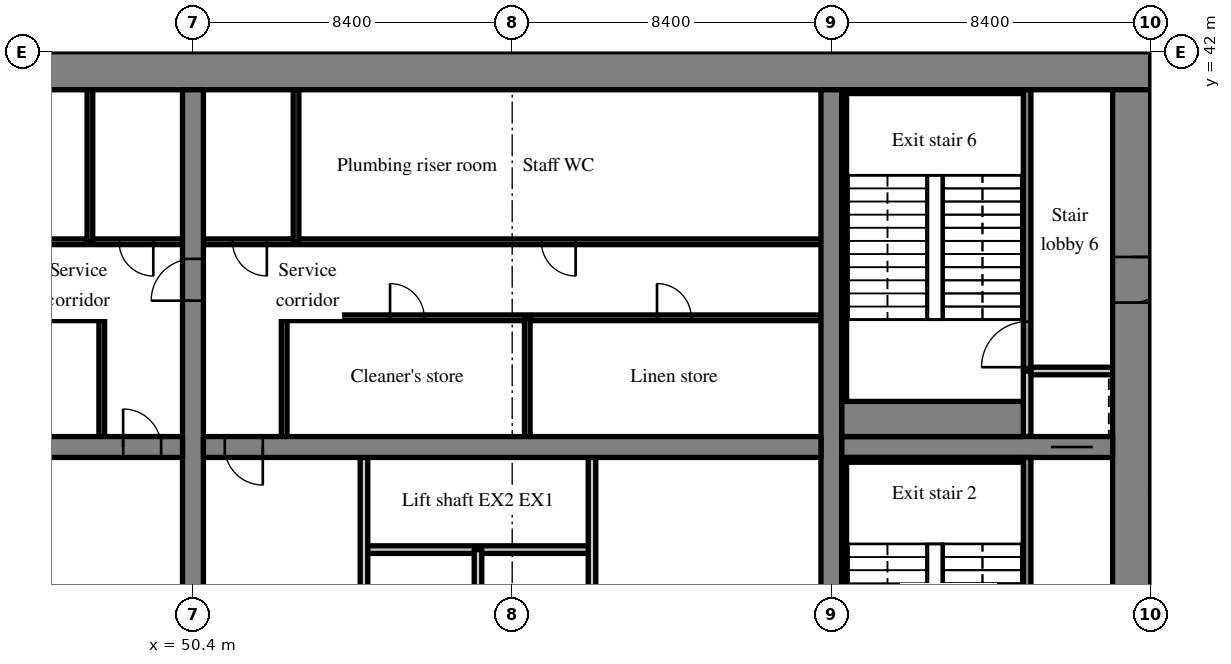
"""IFC4 building model, lengths in metres.
Left out: names, types, materials, properties, quantities, classifications, styles, units other than length and angle.
Written with IfcOpenShell. Run it as: python <this file> out.ifc"""

import sys

from ifc_helpers import new_model, si_unit, direction, frame, frame_2d, origin, place, context, subcontext, project, spatial, rectangle, extrude, source, transform, mapped, element, fill, save


model = new_model("IFC4")
c1 = context("Model", 3, precision=1e-05, world=origin(), true_north=direction((0.0, 1.0)))
c2 = subcontext(c1, "Body", "Model", "MODEL_VIEW")
j1 = project(units=[si_unit("LENGTHUNIT", "METRE"), si_unit("PLANEANGLEUNIT", "RADIAN")], contexts=[c1])
p1 = place(None, origin())
s1 = spatial("IfcSite", under=j1, at=p1, CompositionType="ELEMENT")
p2 = place(p1, origin())
s2 = spatial("IfcBuilding", under=s1, at=p2, CompositionType="ELEMENT")
p3 = place(p2, frame((0.0, 0.0, 50.6)))
s3 = spatial("IfcBuildingStorey", under=s2, at=p3, CompositionType="ELEMENT", Elevation=50.6)
m1 = source(origin(), c2, "Body", "SweptSolid", [
    extrude(rectangle(XDim=50.4, YDim=1.0, at=frame_2d((25.2, 0.0))), origin(), (0.0, 0.0, 1.0), 3.52),
])
p4 = place(p3, frame((25.2, 41.5, 0.0), z_axis=(0.0, 0.0, 1.0), x_axis=(1.0, 0.0, 0.0)))
e1 = element("IfcWall", 1, at=p4, inside=s3, PredefinedType="SHEAR", context=c2, shape_type="MappedRepresentation", body=[
    mapped(m1, transform((0.0, 0.0, 0.0), scale=1.0)),
])
m2 = source(origin(), c2, "Body", "SweptSolid", [
    extrude(rectangle(XDim=18.0, YDim=1.0, at=frame_2d((9.0, 0.0))), origin(), (0.0, 0.0, 1.0), 3.52),
])
p5 = place(p3, frame((75.1, 23.0, 0.0), z_axis=(0.0, 0.0, 1.0), x_axis=(0.0, 1.0, 0.0)))
e2 = element("IfcWall", 2, at=p5, inside=s3, PredefinedType="SHEAR", context=c2, shape_type="MappedRepresentation", body=[
    mapped(m2, transform((0.0, 0.0, 0.0), scale=1.0)),
])
m3 = source(origin(), c2, "Body", "SweptSolid", [
    extrude(rectangle(XDim=1.2, YDim=2.1, at=frame_2d((0.6, 1.05))), frame((0.0, 0.51, 0.0), z_axis=(0.0, -1.0, 0.0), x_axis=(1.0, 0.0, 0.0)), (0.0, 0.0, 1.0), 1.02),
])
p6 = place(p5, frame((12.4, 0.0, 0.0)))
e3 = element("IfcOpeningElement", 3, at=p6, cuts=e2, PredefinedType="OPENING", context=c2, shape_type="MappedRepresentation", body=[
    mapped(m3, transform((0.0, 0.0, 0.0), scale=1.0)),
])
m4 = source(origin(), c2, "Body", "SweptSolid", [
    extrude(rectangle(XDim=18.0, YDim=0.55, at=frame_2d((9.0, 0.0))), origin(), (0.0, 0.0, 1.0), 3.52),
])
p7 = place(p3, frame((50.4, 23.0, 0.0), z_axis=(0.0, 0.0, 1.0), x_axis=(0.0, 1.0, 0.0)))
e4 = element("IfcWall", 4, at=p7, inside=s3, PredefinedType="SHEAR", context=c2, shape_type="MappedRepresentation", body=[
    mapped(m4, transform((0.0, 0.0, 0.0), scale=1.0)),
])
m5 = source(origin(), c2, "Body", "SweptSolid", [
    extrude(rectangle(XDim=1.1, YDim=2.1, at=frame_2d((0.55, 1.05))), frame((0.0, 0.285, 0.0), z_axis=(0.0, -1.0, 0.0), x_axis=(1.0, 0.0, 0.0)), (0.0, 0.0, 1.0), 0.57),
])
p8 = place(p7, frame((12.45, 0.0, 0.0)))
e5 = element("IfcOpeningElement", 5, at=p8, cuts=e4, PredefinedType="OPENING", context=c2, shape_type="MappedRepresentation", body=[
    mapped(m5, transform((0.0, 0.0, 0.0), scale=1.0)),
])
p9 = place(p3, frame((67.2, 23.0, 0.0), z_axis=(0.0, 0.0, 1.0), x_axis=(0.0, 1.0, 0.0)))
e6 = element("IfcWall", 6, at=p9, inside=s3, PredefinedType="SHEAR", context=c2, shape_type="MappedRepresentation", body=[
    mapped(m4, transform((0.0, 0.0, 0.0), scale=1.0)),
])
m6 = source(origin(), c2, "Body", "SweptSolid", [
    extrude(rectangle(XDim=16.25, YDim=0.55, at=frame_2d((8.125, 0.0))), origin(), (0.0, 0.0, 1.0), 3.52),
])
p10 = place(p3, frame((33.875, 31.6, 0.0), z_axis=(0.0, 0.0, 1.0), x_axis=(1.0, 0.0, 0.0)))
e7 = element("IfcWall", 7, at=p10, inside=s3, PredefinedType="SHEAR", context=c2, shape_type="MappedRepresentation", body=[
    mapped(m6, transform((0.0, 0.0, 0.0), scale=1.0)),
])
m7 = source(origin(), c2, "Body", "SweptSolid", [
    extrude(rectangle(XDim=1.0, YDim=2.1, at=frame_2d((0.5, 1.05))), frame((0.0, 0.285, 0.0), z_axis=(0.0, -1.0, 0.0), x_axis=(1.0, 0.0, 0.0)), (0.0, 0.0, 1.0), 0.57),
])
p11 = place(p10, frame((14.687, 0.0, 0.0)))
e8 = element("IfcOpeningElement", 8, at=p11, cuts=e7, PredefinedType="OPENING", context=c2, shape_type="MappedRepresentation", body=[
    mapped(m7, transform((0.0, 0.0, 0.0), scale=1.0)),
])
p12 = place(p3, frame((50.675, 31.6, 0.0), z_axis=(0.0, 0.0, 1.0), x_axis=(1.0, 0.0, 0.0)))
e9 = element("IfcWall", 9, at=p12, inside=s3, PredefinedType="SHEAR", context=c2, shape_type="MappedRepresentation", body=[
    mapped(m6, transform((0.0, 0.0, 0.0), scale=1.0)),
])
p13 = place(p12, frame((0.562, 0.0, 0.0)))
e10 = element("IfcOpeningElement", 10, at=p13, cuts=e9, PredefinedType="OPENING", context=c2, shape_type="MappedRepresentation", body=[
    mapped(m7, transform((0.0, 0.0, 0.0), scale=1.0)),
])
m8 = source(origin(), c2, "Body", "SweptSolid", [
    extrude(rectangle(XDim=7.125, YDim=0.55, at=frame_2d((3.562, 0.0))), origin(), (0.0, 0.0, 1.0), 3.52),
])
p14 = place(p3, frame((67.475, 31.6, 0.0), z_axis=(0.0, 0.0, 1.0), x_axis=(1.0, 0.0, 0.0)))
e11 = element("IfcWall", 11, at=p14, inside=s3, PredefinedType="SHEAR", context=c2, shape_type="MappedRepresentation", body=[
    mapped(m8, transform((0.0, 0.0, 0.0), scale=1.0)),
])
p15 = place(p14, frame((5.5, 0.0, 0.0)))
e12 = element("IfcOpeningElement", 12, at=p15, cuts=e11, PredefinedType="OPENING", context=c2, shape_type="MappedRepresentation", body=[
    mapped(m5, transform((0.0, 0.0, 0.0), scale=1.0)),
])
m9 = source(origin(), c2, "Body", "SweptSolid", [
    extrude(rectangle(XDim=3.559, YDim=0.3, at=frame_2d((1.78, 0.0))), origin(), (0.0, 0.0, 1.0), 3.52),
])
p16 = place(p3, frame((76.523, 43.292, 0.0), z_axis=(0.0, 0.0, 1.0), x_axis=(-0.35779745313, -0.933799219604, 0.0)))
e13 = element("IfcWall", 13, at=p16, inside=s3, PredefinedType="SOLIDWALL", context=c2, shape_type="MappedRepresentation", body=[
    mapped(m9, transform((0.0, 0.0, 0.0), scale=1.0)),
])
m10 = source(origin(), c2, "Body", "SweptSolid", [
    extrude(rectangle(XDim=1.5, YDim=2.0, at=frame_2d((0.75, 1.0))), frame((0.0, 0.16, 0.0), z_axis=(0.0, -1.0, 0.0), x_axis=(1.0, 0.0, 0.0)), (0.0, 0.0, 1.0), 0.32),
])
p17 = place(p16, frame((0.156, 0.0, 0.9)))
e14 = element("IfcOpeningElement", 14, at=p17, cuts=e13, PredefinedType="OPENING", context=c2, shape_type="MappedRepresentation", body=[
    mapped(m10, transform((0.0, 0.0, 0.0), scale=1.0)),
])
m11 = source(origin(), c2, "Body", "SweptSolid", [
    extrude(rectangle(XDim=3.125, YDim=0.15, at=frame_2d((1.562, 0.0))), origin(), (0.0, 0.0, 1.0), 3.52),
])
p18 = place(p3, frame((48.0, 31.875, 0.0), z_axis=(0.0, 0.0, 1.0), x_axis=(0.0, 1.0, 0.0)))
e15 = element("IfcWall", 15, at=p18, inside=s3, PredefinedType="PARTITIONING", context=c2, shape_type="MappedRepresentation", body=[
    mapped(m11, transform((0.0, 0.0, 0.0), scale=1.0)),
])
m12 = source(origin(), c2, "Body", "SweptSolid", [
    extrude(rectangle(XDim=14.125, YDim=0.15, at=frame_2d((7.062, 0.0))), origin(), (0.0, 0.0, 1.0), 3.52),
])
p19 = place(p3, frame((33.875, 35.0, 0.0), z_axis=(0.0, 0.0, 1.0), x_axis=(1.0, 0.0, 0.0)))
e16 = element("IfcWall", 16, at=p19, inside=s3, PredefinedType="PARTITIONING", context=c2, shape_type="MappedRepresentation", body=[
    mapped(m12, transform((0.0, 0.0, 0.0), scale=1.0)),
])
m13 = source(origin(), c2, "Body", "SweptSolid", [
    extrude(rectangle(XDim=0.9, YDim=2.1, at=frame_2d((0.45, 1.05))), frame((0.0, 0.085, 0.0), z_axis=(0.0, -1.0, 0.0), x_axis=(1.0, 0.0, 0.0)), (0.0, 0.0, 1.0), 0.17),
])
p20 = place(p19, frame((6.575, 0.0, 0.0)))
e17 = element("IfcOpeningElement", 17, at=p20, cuts=e16, PredefinedType="OPENING", context=c2, shape_type="MappedRepresentation", body=[
    mapped(m13, transform((0.0, 0.0, 0.0), scale=1.0)),
])
m14 = source(origin(), c2, "Body", "SweptSolid", [
    extrude(rectangle(XDim=16.25, YDim=0.15, at=frame_2d((8.125, 0.0))), origin(), (0.0, 0.0, 1.0), 3.52),
])
p21 = place(p3, frame((33.875, 37.0, 0.0), z_axis=(0.0, 0.0, 1.0), x_axis=(1.0, 0.0, 0.0)))
e18 = element("IfcWall", 18, at=p21, inside=s3, PredefinedType="PARTITIONING", context=c2, shape_type="MappedRepresentation", body=[
    mapped(m14, transform((0.0, 0.0, 0.0), scale=1.0)),
])
p22 = place(p21, frame((0.769, 0.0, 0.0)))
e19 = element("IfcOpeningElement", 19, at=p22, cuts=e18, PredefinedType="OPENING", context=c2, shape_type="MappedRepresentation", body=[
    mapped(m13, transform((0.0, 0.0, 0.0), scale=1.0)),
])
p23 = place(p21, frame((3.613, 0.0, 0.0)))
e20 = element("IfcOpeningElement", 20, at=p23, cuts=e18, PredefinedType="OPENING", context=c2, shape_type="MappedRepresentation", body=[
    mapped(m13, transform((0.0, 0.0, 0.0), scale=1.0)),
])
p24 = place(p21, frame((9.3, 0.0, 0.0)))
e21 = element("IfcOpeningElement", 21, at=p24, cuts=e18, PredefinedType="OPENING", context=c2, shape_type="MappedRepresentation", body=[
    mapped(m13, transform((0.0, 0.0, 0.0), scale=1.0)),
])
p25 = place(p21, frame((14.581, 0.0, 0.0)))
e22 = element("IfcOpeningElement", 22, at=p25, cuts=e18, PredefinedType="OPENING", context=c2, shape_type="MappedRepresentation", body=[
    mapped(m13, transform((0.0, 0.0, 0.0), scale=1.0)),
])
m15 = source(origin(), c2, "Body", "SweptSolid", [
    extrude(rectangle(XDim=4.0, YDim=0.15, at=frame_2d((2.0, 0.0))), origin(), (0.0, 0.0, 1.0), 3.52),
])
p26 = place(p3, frame((47.688, 37.0, 0.0), z_axis=(0.0, 0.0, 1.0), x_axis=(0.0, 1.0, 0.0)))
e23 = element("IfcWall", 23, at=p26, inside=s3, PredefinedType="PARTITIONING", context=c2, shape_type="MappedRepresentation", body=[
    mapped(m15, transform((0.0, 0.0, 0.0), scale=1.0)),
])
m16 = source(origin(), c2, "Body", "SweptSolid", [
    extrude(rectangle(XDim=6.0, YDim=0.2, at=frame_2d((3.0, 0.0))), origin(), (0.0, 0.0, 1.0), 3.52),
])
p27 = place(p3, frame((60.9, 28.9, 0.0), z_axis=(0.0, 0.0, 1.0), x_axis=(-1.0, 0.0, 0.0)))
e24 = element("IfcWall", 24, at=p27, inside=s3, PredefinedType="SOLIDWALL", context=c2, shape_type="MappedRepresentation", body=[
    mapped(m16, transform((0.0, 0.0, 0.0), scale=1.0)),
])
m17 = source(origin(), c2, "Body", "SweptSolid", [
    extrude(rectangle(XDim=8.325, YDim=0.2, at=frame_2d((4.163, 0.0))), origin(), (0.0, 0.0, 1.0), 3.52),
])
for number, where, z_axis, x_axis in (
    (25, (54.9, 23.0, 0.0), (0.0, 0.0, 1.0), (0.0, 1.0, 0.0)),
    (26, (60.9, 23.0, 0.0), (0.0, 0.0, 1.0), (0.0, 1.0, 0.0)),
):
    element("IfcWall", number, at=place(p3, frame(where, z_axis=z_axis, x_axis=x_axis)), inside=s3, PredefinedType="PARTITIONING", context=c2, shape_type="MappedRepresentation", body=[
        mapped(m17, transform((0.0, 0.0, 0.0), scale=1.0)),
    ])
m18 = source(origin(), c2, "Body", "SweptSolid", [
    extrude(rectangle(XDim=5.9, YDim=0.2, at=frame_2d((2.95, 0.0))), origin(), (0.0, 0.0, 1.0), 3.52),
])
p28 = place(p3, frame((57.9, 23.0, 0.0), z_axis=(0.0, 0.0, 1.0), x_axis=(0.0, 1.0, 0.0)))
e27 = element("IfcWall", 27, at=p28, inside=s3, PredefinedType="PARTITIONING", context=c2, shape_type="MappedRepresentation", body=[
    mapped(m18, transform((0.0, 0.0, 0.0), scale=1.0)),
])
p29 = place(p3, frame((52.8, 31.875, 0.0), z_axis=(0.0, 0.0, 1.0), x_axis=(0.0, 1.0, 0.0)))
e28 = element("IfcWall", 28, at=p29, inside=s3, PredefinedType="PARTITIONING", context=c2, shape_type="MappedRepresentation", body=[
    mapped(m11, transform((0.0, 0.0, 0.0), scale=1.0)),
])
p30 = place(p3, frame((66.925, 35.0, 0.0), z_axis=(0.0, 0.0, 1.0), x_axis=(-1.0, 0.0, 0.0)))
e29 = element("IfcWall", 29, at=p30, inside=s3, PredefinedType="PARTITIONING", context=c2, shape_type="MappedRepresentation", body=[
    mapped(m12, transform((0.0, 0.0, 0.0), scale=1.0)),
])
p31 = place(p30, frame((3.414, 0.0, 0.0)))
e30 = element("IfcOpeningElement", 30, at=p31, cuts=e29, PredefinedType="OPENING", context=c2, shape_type="MappedRepresentation", body=[
    mapped(m13, transform((0.0, 0.0, 0.0), scale=1.0)),
])
p32 = place(p30, frame((10.439, 0.0, 0.0)))
e31 = element("IfcOpeningElement", 31, at=p32, cuts=e29, PredefinedType="OPENING", context=c2, shape_type="MappedRepresentation", body=[
    mapped(m13, transform((0.0, 0.0, 0.0), scale=1.0)),
])
p33 = place(p3, frame((66.925, 37.0, 0.0), z_axis=(0.0, 0.0, 1.0), x_axis=(-1.0, 0.0, 0.0)))
e32 = element("IfcWall", 32, at=p33, inside=s3, PredefinedType="PARTITIONING", context=c2, shape_type="MappedRepresentation", body=[
    mapped(m14, transform((0.0, 0.0, 0.0), scale=1.0)),
])
p34 = place(p33, frame((6.456, 0.0, 0.0)))
e33 = element("IfcOpeningElement", 33, at=p34, cuts=e32, PredefinedType="OPENING", context=c2, shape_type="MappedRepresentation", body=[
    mapped(m13, transform((0.0, 0.0, 0.0), scale=1.0)),
])
p35 = place(p33, frame((14.581, 0.0, 0.0)))
e34 = element("IfcOpeningElement", 34, at=p35, cuts=e32, PredefinedType="OPENING", context=c2, shape_type="MappedRepresentation", body=[
    mapped(m13, transform((0.0, 0.0, 0.0), scale=1.0)),
])
p36 = place(p3, frame((59.197, 31.875, 0.0), z_axis=(0.0, 0.0, 1.0), x_axis=(0.0, 1.0, 0.0)))
e35 = element("IfcWall", 35, at=p36, inside=s3, PredefinedType="PARTITIONING", context=c2, shape_type="MappedRepresentation", body=[
    mapped(m11, transform((0.0, 0.0, 0.0), scale=1.0)),
])
p37 = place(p3, frame((53.112, 37.0, 0.0), z_axis=(0.0, 0.0, 1.0), x_axis=(0.0, 1.0, 0.0)))
e36 = element("IfcWall", 36, at=p37, inside=s3, PredefinedType="PARTITIONING", context=c2, shape_type="MappedRepresentation", body=[
    mapped(m15, transform((0.0, 0.0, 0.0), scale=1.0)),
])
m19 = source(origin(), c2, "Body", "SweptSolid", [
    extrude(rectangle(XDim=8.325, YDim=0.2, at=frame_2d((4.163, 0.0))), origin(), (0.0, 0.0, 1.0), 3.52),
])
p38 = place(p3, frame((72.35, 23.0, 0.0), z_axis=(0.0, 0.0, 1.0), x_axis=(0.0, 1.0, 0.0)))
e37 = element("IfcWall", 37, at=p38, inside=s3, PredefinedType="SOLIDWALL", context=c2, shape_type="MappedRepresentation", body=[
    mapped(m19, transform((0.0, 0.0, 0.0), scale=1.0)),
])
m20 = source(origin(), c2, "Body", "SweptSolid", [
    extrude(rectangle(XDim=1.2, YDim=2.1, at=frame_2d((0.6, 1.05))), frame((0.0, 0.11, 0.0), z_axis=(0.0, -1.0, 0.0), x_axis=(1.0, 0.0, 0.0)), (0.0, 0.0, 1.0), 0.22),
])
p39 = place(p38, frame((0.6, 0.0, 0.0)))
e38 = element("IfcOpeningElement", 38, at=p39, cuts=e37, PredefinedType="OPENING", context=c2, shape_type="MappedRepresentation", body=[
    mapped(m20, transform((0.0, 0.0, 0.0), scale=1.0)),
])
m21 = source(origin(), c2, "Body", "SweptSolid", [
    extrude(rectangle(XDim=1.725, YDim=0.2, at=frame_2d((0.863, 0.0))), origin(), (0.0, 0.0, 1.0), 3.52),
])
p40 = place(p3, frame((72.35, 31.875, 0.0), z_axis=(0.0, 0.0, 1.0), x_axis=(0.0, 1.0, 0.0)))
e39 = element("IfcWall", 39, at=p40, inside=s3, PredefinedType="SOLIDWALL", context=c2, shape_type="MappedRepresentation", body=[
    mapped(m21, transform((0.0, 0.0, 0.0), scale=1.0)),
])
m22 = source(origin(), c2, "Body", "SweptSolid", [
    extrude(rectangle(XDim=2.15, YDim=0.2, at=frame_2d((1.075, 0.0))), origin(), (0.0, 0.0, 1.0), 3.52),
])
p41 = place(p3, frame((72.45, 33.6, 0.0), z_axis=(0.0, 0.0, 1.0), x_axis=(1.0, 0.0, 0.0)))
e40 = element("IfcWall", 40, at=p41, inside=s3, PredefinedType="SOLIDWALL", context=c2, shape_type="MappedRepresentation", body=[
    mapped(m22, transform((0.0, 0.0, 0.0), scale=1.0)),
])
m23 = source(origin(), c2, "Body", "SweptSolid", [
    extrude(rectangle(XDim=7.4, YDim=0.2, at=frame_2d((3.7, 0.0))), origin(), (0.0, 0.0, 1.0), 3.52),
])
p42 = place(p3, frame((72.35, 33.6, 0.0), z_axis=(0.0, 0.0, 1.0), x_axis=(0.0, 1.0, 0.0)))
e41 = element("IfcWall", 41, at=p42, inside=s3, PredefinedType="SOLIDWALL", context=c2, shape_type="MappedRepresentation", body=[
    mapped(m23, transform((0.0, 0.0, 0.0), scale=1.0)),
])
p43 = place(p42, frame((0.1, 0.0, 0.0)))
e42 = element("IfcOpeningElement", 42, at=p43, cuts=e41, PredefinedType="OPENING", context=c2, shape_type="MappedRepresentation", body=[
    mapped(m20, transform((0.0, 0.0, 0.0), scale=1.0)),
])
m24 = source(origin(), c2, "Body", "SweptSolid", [
    extrude(rectangle(XDim=8.2, YDim=0.2, at=frame_2d((4.1, 0.0))), origin(), (0.0, 0.0, 1.0), 3.52),
])
p44 = place(p3, frame((83.8, 30.4, 0.0), z_axis=(0.0, 0.0, 1.0), x_axis=(-1.0, 0.0, 0.0)))
e43 = element("IfcWall", 43, at=p44, inside=s3, PredefinedType="SOLIDWALL", context=c2, shape_type="MappedRepresentation", body=[
    mapped(m24, transform((0.0, 0.0, 0.0), scale=1.0)),
])
m25 = source(origin(), c2, "Body", "SweptSolid", [
    extrude(rectangle(XDim=1.0, YDim=2.1, at=frame_2d((0.5, 1.05))), frame((0.0, 0.11, 0.0), z_axis=(0.0, -1.0, 0.0), x_axis=(1.0, 0.0, 0.0)), (0.0, 0.0, 1.0), 0.22),
])
p45 = place(p44, frame((6.1, 0.0, 0.0)))
e44 = element("IfcOpeningElement", 44, at=p45, cuts=e43, PredefinedType="OPENING", context=c2, shape_type="MappedRepresentation", body=[
    mapped(m25, transform((0.0, 0.0, 0.0), scale=1.0)),
])
m26 = source(origin(), c2, "Body", "SweptSolid", [
    extrude(rectangle(XDim=4.775, YDim=0.125, at=frame_2d((2.387, 0.0))), origin(), (0.0, 0.0, 1.0), 3.52),
])
p46 = place(p3, frame((67.475, 31.262, 0.0), z_axis=(0.0, 0.0, 1.0), x_axis=(1.0, 0.0, 0.0)))
e45 = element("IfcWall", 45, at=p46, inside=s3, PredefinedType="SOLIDWALL", context=c2, shape_type="MappedRepresentation", body=[
    mapped(m26, transform((0.0, 0.0, 0.0), scale=1.0)),
])
m27 = source(origin(), c2, "Body", "SweptSolid", [
    extrude(rectangle(XDim=8.1, YDim=0.125, at=frame_2d((4.05, 0.0))), origin(), (0.0, 0.0, 1.0), 3.52),
])
p47 = place(p3, frame((67.537, 23.1, 0.0), z_axis=(0.0, 0.0, 1.0), x_axis=(0.0, 1.0, 0.0)))
e46 = element("IfcWall", 46, at=p47, inside=s3, PredefinedType="SOLIDWALL", context=c2, shape_type="MappedRepresentation", body=[
    mapped(m27, transform((0.0, 0.0, 0.0), scale=1.0)),
])
m28 = source(origin(), c2, "Body", "SweptSolid", [
    extrude(rectangle(XDim=4.775, YDim=0.1, at=frame_2d((2.387, 0.0))), origin(), (0.0, 0.0, 1.0), 3.52),
])
p48 = place(p3, frame((67.475, 40.95, 0.0), z_axis=(0.0, 0.0, 1.0), x_axis=(1.0, 0.0, 0.0)))
e47 = element("IfcWall", 47, at=p48, inside=s3, PredefinedType="SOLIDWALL", context=c2, shape_type="MappedRepresentation", body=[
    mapped(m28, transform((0.0, 0.0, 0.0), scale=1.0)),
])
m29 = source(origin(), c2, "Body", "SweptSolid", [
    extrude(rectangle(XDim=4.775, YDim=0.925, at=frame_2d((2.387, 0.0))), origin(), (0.0, 0.0, 1.0), 3.52),
])
p49 = place(p3, frame((67.475, 32.337, 0.0), z_axis=(0.0, 0.0, 1.0), x_axis=(1.0, 0.0, 0.0)))
e48 = element("IfcWall", 48, at=p49, inside=s3, PredefinedType="SOLIDWALL", context=c2, shape_type="MappedRepresentation", body=[
    mapped(m29, transform((0.0, 0.0, 0.0), scale=1.0)),
])
p50 = place(p3, frame((67.537, 32.8, 0.0), z_axis=(0.0, 0.0, 1.0), x_axis=(0.0, 1.0, 0.0)))
e49 = element("IfcWall", 49, at=p50, inside=s3, PredefinedType="SOLIDWALL", context=c2, shape_type="MappedRepresentation", body=[
    mapped(m27, transform((0.0, 0.0, 0.0), scale=1.0)),
])
m30 = source(origin(), c2, "Body", "SweptSolid", [
    extrude(rectangle(XDim=1.0, YDim=2.1, at=frame_2d((0.5, 1.05))), frame((0.0, 0.025, 0.0), z_axis=(0.0, -1.0, 0.0), x_axis=(1.0, 0.0, 0.0)), (0.0, 0.0, 1.0), 0.05),
])
p51 = place(p11, origin())
e50 = element("IfcDoor", 50, at=p51, inside=s3, OperationType="SINGLE_SWING_LEFT", PredefinedType="DOOR", context=c2, shape_type="MappedRepresentation", body=[
    mapped(m30, transform((0.0, 0.0, 0.0), scale=1.0)),
])
fill(e8, e50)
m31 = source(origin(), c2, "Body", "SweptSolid", [
    extrude(rectangle(XDim=0.9, YDim=2.1, at=frame_2d((0.45, 1.05))), frame((0.0, 0.025, 0.0), z_axis=(0.0, -1.0, 0.0), x_axis=(1.0, 0.0, 0.0)), (0.0, 0.0, 1.0), 0.05),
])
p52 = place(p25, origin())
e51 = element("IfcDoor", 51, at=p52, inside=s3, OperationType="SINGLE_SWING_RIGHT", PredefinedType="DOOR", context=c2, shape_type="MappedRepresentation", body=[
    mapped(m31, transform((0.0, 0.0, 0.0), scale=1.0)),
])
fill(e22, e51)
p53 = place(p13, origin())
e52 = element("IfcDoor", 52, at=p53, inside=s3, OperationType="SINGLE_SWING_RIGHT", PredefinedType="DOOR", context=c2, shape_type="MappedRepresentation", body=[
    mapped(m30, transform((0.0, 0.0, 0.0), scale=1.0)),
])
fill(e10, e52)
p54 = place(p31, origin())
e53 = element("IfcDoor", 53, at=p54, inside=s3, OperationType="SINGLE_SWING_RIGHT", PredefinedType="DOOR", context=c2, shape_type="MappedRepresentation", body=[
    mapped(m31, transform((0.0, 0.0, 0.0), scale=1.0)),
])
fill(e30, e53)
p55 = place(p32, origin())
e54 = element("IfcDoor", 54, at=p55, inside=s3, OperationType="SINGLE_SWING_RIGHT", PredefinedType="DOOR", context=c2, shape_type="MappedRepresentation", body=[
    mapped(m31, transform((0.0, 0.0, 0.0), scale=1.0)),
])
fill(e31, e54)
p56 = place(p34, origin())
e55 = element("IfcDoor", 55, at=p56, inside=s3, OperationType="SINGLE_SWING_LEFT", PredefinedType="DOOR", context=c2, shape_type="MappedRepresentation", body=[
    mapped(m31, transform((0.0, 0.0, 0.0), scale=1.0)),
])
fill(e33, e55)
p57 = place(p35, origin())
e56 = element("IfcDoor", 56, at=p57, inside=s3, OperationType="SINGLE_SWING_LEFT", PredefinedType="DOOR", context=c2, shape_type="MappedRepresentation", body=[
    mapped(m31, transform((0.0, 0.0, 0.0), scale=1.0)),
])
fill(e34, e56)
m32 = source(origin(), c2, "Body", "SweptSolid", [
    extrude(rectangle(XDim=1.1, YDim=2.1, at=frame_2d((0.55, 1.05))), frame((0.0, 0.025, 0.0), z_axis=(0.0, -1.0, 0.0), x_axis=(1.0, 0.0, 0.0)), (0.0, 0.0, 1.0), 0.05),
])
p58 = place(p15, origin())
e57 = element("IfcDoor", 57, at=p58, inside=s3, OperationType="SLIDING_TO_LEFT", PredefinedType="DOOR", context=c2, shape_type="MappedRepresentation", body=[
    mapped(m32, transform((0.0, 0.0, 0.0), scale=1.0)),
])
fill(e12, e57)
m33 = source(origin(), c2, "Body", "SweptSolid", [
    extrude(rectangle(XDim=1.2, YDim=2.1, at=frame_2d((0.6, 1.05))), frame((0.0, 0.025, 0.0), z_axis=(0.0, -1.0, 0.0), x_axis=(1.0, 0.0, 0.0)), (0.0, 0.0, 1.0), 0.05),
])
p59 = place(p43, origin())
e58 = element("IfcDoor", 58, at=p59, inside=s3, OperationType="SINGLE_SWING_LEFT", PredefinedType="DOOR", context=c2, shape_type="MappedRepresentation", body=[
    mapped(m33, transform((0.0, 0.0, 0.0), scale=1.0)),
])
fill(e42, e58)
p60 = place(p6, origin())
e59 = element("IfcDoor", 59, at=p60, inside=s3, OperationType="SINGLE_SWING_RIGHT", PredefinedType="DOOR", context=c2, shape_type="MappedRepresentation", body=[
    mapped(m33, transform((0.0, 0.0, 0.0), scale=1.0)),
])
fill(e3, e59)
p61 = place(p8, origin())
e60 = element("IfcDoor", 60, at=p61, inside=s3, OperationType="SINGLE_SWING_LEFT", PredefinedType="DOOR", context=c2, shape_type="MappedRepresentation", body=[
    mapped(m32, transform((0.0, 0.0, 0.0), scale=1.0)),
])
fill(e5, e60)
save(model, sys.argv[1])
